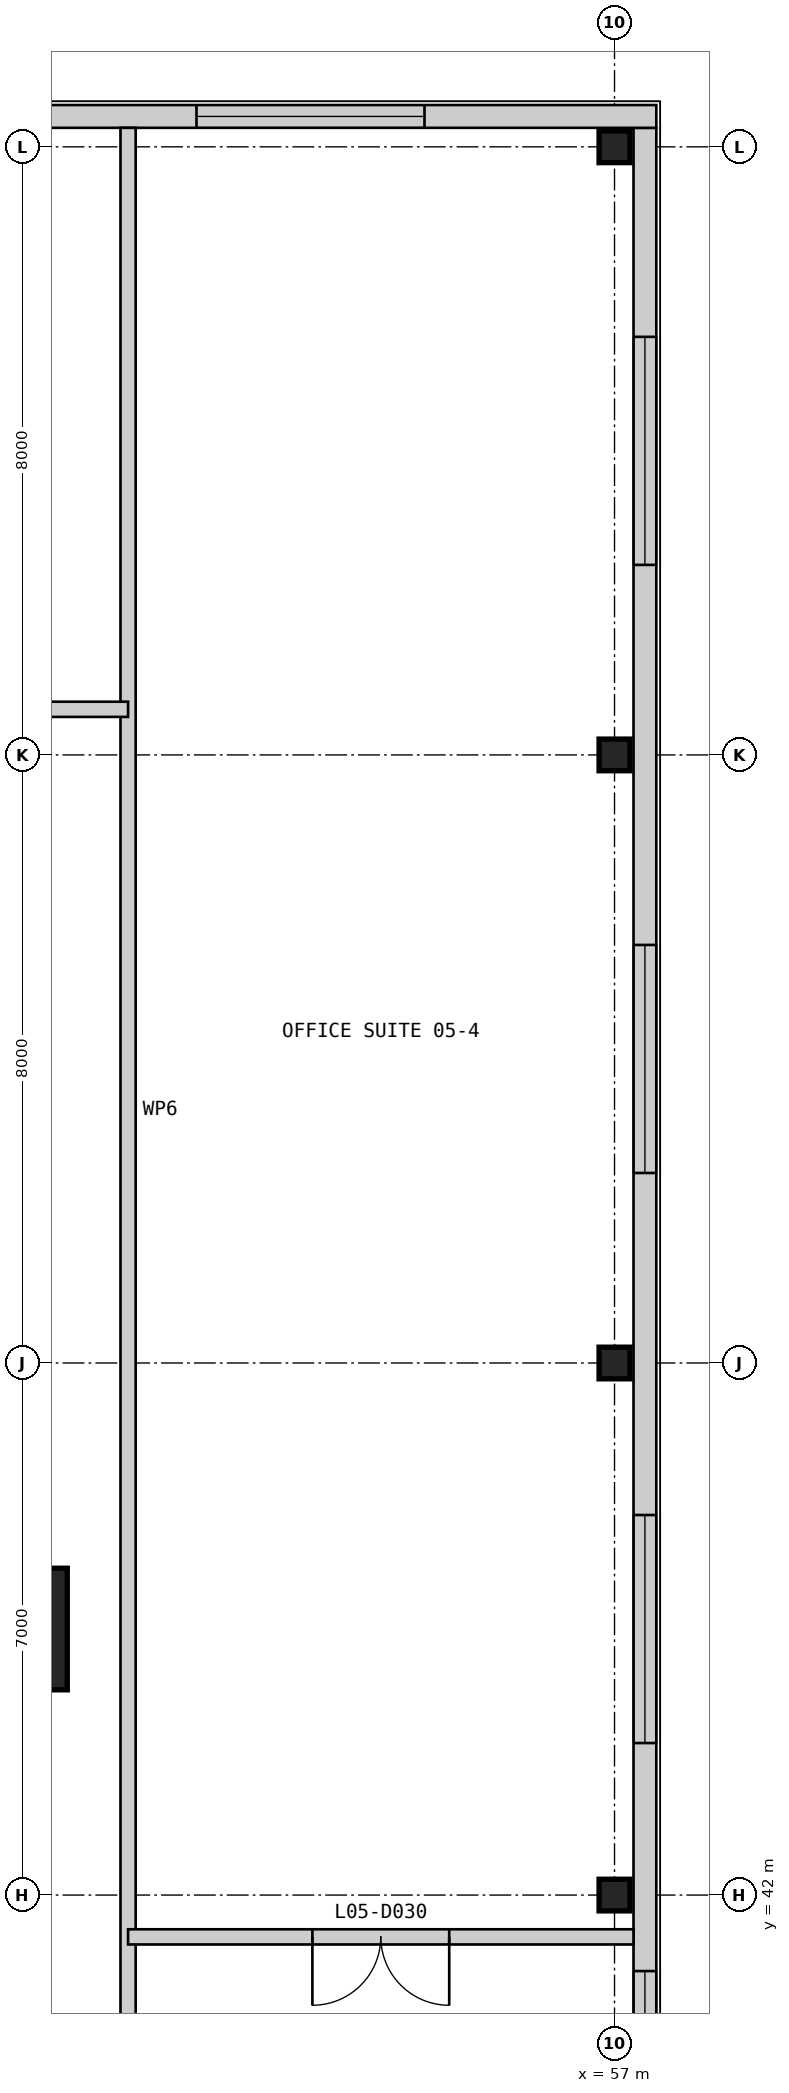
"""IFC4 building model, lengths in metres.
Left out: names, types, materials, properties, quantities, classifications, styles, units other than length and angle.
Written with IfcOpenShell. Run it as: python <this file> out.ifc"""

import sys

from ifc_helpers import new_model, si_unit, direction, frame, frame_2d, origin, origin_2d, place, context, subcontext, project, spatial, rectangle, i_section, extrude, element, fill, save


model = new_model("IFC4")
c1 = context("Model", 3, precision=1e-05, world=origin(), true_north=direction((0.0, 1.0)))
c2 = subcontext(c1, "Body", "Model", "MODEL_VIEW")
j1 = project(units=[si_unit("LENGTHUNIT", "METRE"), si_unit("PLANEANGLEUNIT", "RADIAN")], contexts=[c1])
p1 = place(None, origin())
s1 = spatial("IfcSite", under=j1, at=p1, CompositionType="ELEMENT")
p2 = place(p1, origin())
s2 = spatial("IfcBuilding", under=s1, at=p2, CompositionType="ELEMENT")
p3 = place(p2, frame((0.0, 0.0, 26.2)))
s3 = spatial("IfcBuildingStorey", under=s2, at=p3, CompositionType="ELEMENT", Elevation=26.2)
p4 = place(p3, frame((49.0, 45.5, 0.0), z_axis=(0.0, 0.0, 1.0), x_axis=(1.0, 0.0, 0.0)))
e1 = element("IfcColumn", 1, at=p4, inside=s3, PredefinedType="COLUMN", context=c2, shape_type="SweptSolid", body=[
    extrude(rectangle(XDim=1.6, YDim=1.6, at=origin_2d()), origin(), (0.0, 0.0, 1.0), 4.8),
])
for number, where, z_axis, x_axis in (
    (2, (57.0, 42.0, 0.0), (0.0, 0.0, 1.0), (1.0, 0.0, 0.0)),
    (3, (57.0, 49.0, 0.0), (0.0, 0.0, 1.0), (1.0, 0.0, 0.0)),
    (4, (57.0, 57.0, 0.0), (0.0, 0.0, 1.0), (1.0, 0.0, 0.0)),
    (5, (57.0, 65.0, 0.0), (0.0, 0.0, 1.0), (1.0, 0.0, 0.0)),
):
    element("IfcColumn", number, at=place(p3, frame(where, z_axis=z_axis, x_axis=x_axis)), inside=s3, PredefinedType="COLUMN", context=c2, shape_type="SweptSolid", body=[
        extrude(i_section(OverallWidth=0.406, OverallDepth=0.417, WebThickness=0.03, FlangeThickness=0.048, at=origin_2d()), origin(), (0.0, 0.0, 1.0), 4.8),
    ])
p5 = place(p3, frame((57.4, -7.25, 0.0), z_axis=(0.0, 0.0, 1.0), x_axis=(0.0, 1.0, 0.0)))
e6 = element("IfcWall", 6, at=p5, inside=s3, PredefinedType="SOLIDWALL", context=c2, shape_type="SweptSolid", body=[
    extrude(rectangle(XDim=72.5, YDim=0.3, at=frame_2d((36.25, 0.0))), origin(), (0.0, 0.0, 1.0), 4.5),
])
p6 = place(p5, frame((2.75, 0.0, 0.9)))
e7 = element("IfcOpeningElement", 7, at=p6, cuts=e6, PredefinedType="OPENING", context=c2, shape_type="SweptSolid", body=[
    extrude(rectangle(XDim=3.0, YDim=2.4, at=frame_2d((1.5, 1.2))), frame((0.0, 0.16, 0.0), z_axis=(0.0, -1.0, 0.0), x_axis=(1.0, 0.0, 0.0)), (0.0, 0.0, 1.0), 0.32),
])
p7 = place(p5, frame((10.75, 0.0, 0.9)))
e8 = element("IfcOpeningElement", 8, at=p7, cuts=e6, PredefinedType="OPENING", context=c2, shape_type="SweptSolid", body=[
    extrude(rectangle(XDim=3.0, YDim=2.4, at=frame_2d((1.5, 1.2))), frame((0.0, 0.16, 0.0), z_axis=(0.0, -1.0, 0.0), x_axis=(1.0, 0.0, 0.0)), (0.0, 0.0, 1.0), 0.32),
])
p8 = place(p5, frame((24.75, 0.0, 0.9)))
e9 = element("IfcOpeningElement", 9, at=p8, cuts=e6, PredefinedType="OPENING", context=c2, shape_type="SweptSolid", body=[
    extrude(rectangle(XDim=3.0, YDim=2.4, at=frame_2d((1.5, 1.2))), frame((0.0, 0.16, 0.0), z_axis=(0.0, -1.0, 0.0), x_axis=(1.0, 0.0, 0.0)), (0.0, 0.0, 1.0), 0.32),
])
p9 = place(p5, frame((36.75, 0.0, 0.9)))
e10 = element("IfcOpeningElement", 10, at=p9, cuts=e6, PredefinedType="OPENING", context=c2, shape_type="SweptSolid", body=[
    extrude(rectangle(XDim=3.0, YDim=2.4, at=frame_2d((1.5, 1.2))), frame((0.0, 0.16, 0.0), z_axis=(0.0, -1.0, 0.0), x_axis=(1.0, 0.0, 0.0)), (0.0, 0.0, 1.0), 0.32),
])
p10 = place(p5, frame((45.25, 0.0, 0.9)))
e11 = element("IfcOpeningElement", 11, at=p10, cuts=e6, PredefinedType="OPENING", context=c2, shape_type="SweptSolid", body=[
    extrude(rectangle(XDim=3.0, YDim=2.4, at=frame_2d((1.5, 1.2))), frame((0.0, 0.16, 0.0), z_axis=(0.0, -1.0, 0.0), x_axis=(1.0, 0.0, 0.0)), (0.0, 0.0, 1.0), 0.32),
])
p11 = place(p5, frame((51.25, 0.0, 0.9)))
e12 = element("IfcOpeningElement", 12, at=p11, cuts=e6, PredefinedType="OPENING", context=c2, shape_type="SweptSolid", body=[
    extrude(rectangle(XDim=3.0, YDim=2.4, at=frame_2d((1.5, 1.2))), frame((0.0, 0.16, 0.0), z_axis=(0.0, -1.0, 0.0), x_axis=(1.0, 0.0, 0.0)), (0.0, 0.0, 1.0), 0.32),
])
p12 = place(p5, frame((58.75, 0.0, 0.9)))
e13 = element("IfcOpeningElement", 13, at=p12, cuts=e6, PredefinedType="OPENING", context=c2, shape_type="SweptSolid", body=[
    extrude(rectangle(XDim=3.0, YDim=2.4, at=frame_2d((1.5, 1.2))), frame((0.0, 0.16, 0.0), z_axis=(0.0, -1.0, 0.0), x_axis=(1.0, 0.0, 0.0)), (0.0, 0.0, 1.0), 0.32),
])
p13 = place(p5, frame((66.75, 0.0, 0.9)))
e14 = element("IfcOpeningElement", 14, at=p13, cuts=e6, PredefinedType="OPENING", context=c2, shape_type="SweptSolid", body=[
    extrude(rectangle(XDim=3.0, YDim=2.4, at=frame_2d((1.5, 1.2))), frame((0.0, 0.16, 0.0), z_axis=(0.0, -1.0, 0.0), x_axis=(1.0, 0.0, 0.0)), (0.0, 0.0, 1.0), 0.32),
])
p14 = place(p3, frame((57.55, 65.4, 0.0), z_axis=(0.0, 0.0, 1.0), x_axis=(-1.0, 0.0, 0.0)))
e15 = element("IfcWall", 15, at=p14, inside=s3, PredefinedType="SOLIDWALL", context=c2, shape_type="SweptSolid", body=[
    extrude(rectangle(XDim=65.1, YDim=0.3, at=frame_2d((32.55, 0.0))), origin(), (0.0, 0.0, 1.0), 4.5),
])
p15 = place(p14, frame((59.05, 0.0, 0.9)))
e16 = element("IfcOpeningElement", 16, at=p15, cuts=e15, PredefinedType="OPENING", context=c2, shape_type="SweptSolid", body=[
    extrude(rectangle(XDim=3.0, YDim=2.4, at=frame_2d((1.5, 1.2))), frame((0.0, 0.16, 0.0), z_axis=(0.0, -1.0, 0.0), x_axis=(1.0, 0.0, 0.0)), (0.0, 0.0, 1.0), 0.32),
])
p16 = place(p14, frame((51.05, 0.0, 0.9)))
e17 = element("IfcOpeningElement", 17, at=p16, cuts=e15, PredefinedType="OPENING", context=c2, shape_type="SweptSolid", body=[
    extrude(rectangle(XDim=3.0, YDim=2.4, at=frame_2d((1.5, 1.2))), frame((0.0, 0.16, 0.0), z_axis=(0.0, -1.0, 0.0), x_axis=(1.0, 0.0, 0.0)), (0.0, 0.0, 1.0), 0.32),
])
p17 = place(p14, frame((37.05, 0.0, 0.9)))
e18 = element("IfcOpeningElement", 18, at=p17, cuts=e15, PredefinedType="OPENING", context=c2, shape_type="SweptSolid", body=[
    extrude(rectangle(XDim=3.0, YDim=2.4, at=frame_2d((1.5, 1.2))), frame((0.0, 0.16, 0.0), z_axis=(0.0, -1.0, 0.0), x_axis=(1.0, 0.0, 0.0)), (0.0, 0.0, 1.0), 0.32),
])
p18 = place(p14, frame((25.05, 0.0, 0.9)))
e19 = element("IfcOpeningElement", 19, at=p18, cuts=e15, PredefinedType="OPENING", context=c2, shape_type="SweptSolid", body=[
    extrude(rectangle(XDim=3.0, YDim=2.4, at=frame_2d((1.5, 1.2))), frame((0.0, 0.16, 0.0), z_axis=(0.0, -1.0, 0.0), x_axis=(1.0, 0.0, 0.0)), (0.0, 0.0, 1.0), 0.32),
])
p19 = place(p14, frame((16.55, 0.0, 0.9)))
e20 = element("IfcOpeningElement", 20, at=p19, cuts=e15, PredefinedType="OPENING", context=c2, shape_type="SweptSolid", body=[
    extrude(rectangle(XDim=3.0, YDim=2.4, at=frame_2d((1.5, 1.2))), frame((0.0, 0.16, 0.0), z_axis=(0.0, -1.0, 0.0), x_axis=(1.0, 0.0, 0.0)), (0.0, 0.0, 1.0), 0.32),
])
p20 = place(p14, frame((10.55, 0.0, 0.9)))
e21 = element("IfcOpeningElement", 21, at=p20, cuts=e15, PredefinedType="OPENING", context=c2, shape_type="SweptSolid", body=[
    extrude(rectangle(XDim=3.0, YDim=2.4, at=frame_2d((1.5, 1.2))), frame((0.0, 0.16, 0.0), z_axis=(0.0, -1.0, 0.0), x_axis=(1.0, 0.0, 0.0)), (0.0, 0.0, 1.0), 0.32),
])
p21 = place(p14, frame((3.05, 0.0, 0.9)))
e22 = element("IfcOpeningElement", 22, at=p21, cuts=e15, PredefinedType="OPENING", context=c2, shape_type="SweptSolid", body=[
    extrude(rectangle(XDim=3.0, YDim=2.4, at=frame_2d((1.5, 1.2))), frame((0.0, 0.16, 0.0), z_axis=(0.0, -1.0, 0.0), x_axis=(1.0, 0.0, 0.0)), (0.0, 0.0, 1.0), 0.32),
])
p22 = place(p3, frame((50.6, 39.4, 0.0), z_axis=(0.0, 0.0, 1.0), x_axis=(0.0, 1.0, 0.0)))
e23 = element("IfcWall", 23, at=p22, inside=s3, PredefinedType="PARTITIONING", context=c2, shape_type="SweptSolid", body=[
    extrude(rectangle(XDim=25.85, YDim=0.2, at=frame_2d((12.925, 0.0))), origin(), (0.0, 0.0, 1.0), 4.5),
])
p23 = place(p3, frame((50.6, 41.45, 0.0), z_axis=(0.0, 0.0, 1.0), x_axis=(1.0, 0.0, 0.0)))
e24 = element("IfcWall", 24, at=p23, inside=s3, PredefinedType="PARTITIONING", context=c2, shape_type="SweptSolid", body=[
    extrude(rectangle(XDim=6.65, YDim=0.2, at=frame_2d((3.325, 0.0))), origin(), (0.0, 0.0, 1.0), 4.5),
])
p24 = place(p23, frame((2.425, 0.0, 0.0)))
e25 = element("IfcOpeningElement", 25, at=p24, cuts=e24, PredefinedType="OPENING", context=c2, shape_type="SweptSolid", body=[
    extrude(rectangle(XDim=1.8, YDim=2.4, at=frame_2d((0.9, 1.2))), frame((0.0, 0.11, 0.0), z_axis=(0.0, -1.0, 0.0), x_axis=(1.0, 0.0, 0.0)), (0.0, 0.0, 1.0), 0.22),
])
p25 = place(p3, frame((34.4, 57.6, 0.0), z_axis=(0.0, 0.0, 1.0), x_axis=(1.0, 0.0, 0.0)))
e26 = element("IfcWall", 26, at=p25, inside=s3, PredefinedType="PARTITIONING", context=c2, shape_type="SweptSolid", body=[
    extrude(rectangle(XDim=16.2, YDim=0.2, at=frame_2d((8.1, 0.0))), origin(), (0.0, 0.0, 1.0), 4.5),
])
p26 = place(p10, origin())
e27 = element("IfcWindow", 27, at=p26, inside=s3, PartitioningType="SINGLE_PANEL", PredefinedType="WINDOW", context=c2, shape_type="SweptSolid", body=[
    extrude(rectangle(XDim=3.0, YDim=2.4, at=frame_2d((1.5, 1.2))), frame((0.0, 0.03, 0.0), z_axis=(0.0, -1.0, 0.0), x_axis=(1.0, 0.0, 0.0)), (0.0, 0.0, 1.0), 0.06),
])
fill(e11, e27)
p27 = place(p11, origin())
e28 = element("IfcWindow", 28, at=p27, inside=s3, PartitioningType="SINGLE_PANEL", PredefinedType="WINDOW", context=c2, shape_type="SweptSolid", body=[
    extrude(rectangle(XDim=3.0, YDim=2.4, at=frame_2d((1.5, 1.2))), frame((0.0, 0.03, 0.0), z_axis=(0.0, -1.0, 0.0), x_axis=(1.0, 0.0, 0.0)), (0.0, 0.0, 1.0), 0.06),
])
fill(e12, e28)
p28 = place(p12, origin())
e29 = element("IfcWindow", 29, at=p28, inside=s3, PartitioningType="SINGLE_PANEL", PredefinedType="WINDOW", context=c2, shape_type="SweptSolid", body=[
    extrude(rectangle(XDim=3.0, YDim=2.4, at=frame_2d((1.5, 1.2))), frame((0.0, 0.03, 0.0), z_axis=(0.0, -1.0, 0.0), x_axis=(1.0, 0.0, 0.0)), (0.0, 0.0, 1.0), 0.06),
])
fill(e13, e29)
p29 = place(p13, origin())
e30 = element("IfcWindow", 30, at=p29, inside=s3, PartitioningType="SINGLE_PANEL", PredefinedType="WINDOW", context=c2, shape_type="SweptSolid", body=[
    extrude(rectangle(XDim=3.0, YDim=2.4, at=frame_2d((1.5, 1.2))), frame((0.0, 0.03, 0.0), z_axis=(0.0, -1.0, 0.0), x_axis=(1.0, 0.0, 0.0)), (0.0, 0.0, 1.0), 0.06),
])
fill(e14, e30)
p30 = place(p21, origin())
e31 = element("IfcWindow", 31, at=p30, inside=s3, PartitioningType="SINGLE_PANEL", PredefinedType="WINDOW", context=c2, shape_type="SweptSolid", body=[
    extrude(rectangle(XDim=3.0, YDim=2.4, at=frame_2d((1.5, 1.2))), frame((0.0, 0.03, 0.0), z_axis=(0.0, -1.0, 0.0), x_axis=(1.0, 0.0, 0.0)), (0.0, 0.0, 1.0), 0.06),
])
fill(e22, e31)
p31 = place(p24, frame((1.8, 0.0, 0.0), z_axis=(0.0, 0.0, 1.0), x_axis=(-1.0, 0.0, 0.0)))
e32 = element("IfcDoor", 32, at=p31, inside=s3, OperationType="DOUBLE_DOOR_SINGLE_SWING", PredefinedType="DOOR", context=c2, shape_type="SweptSolid", body=[
    extrude(rectangle(XDim=1.8, YDim=2.4, at=frame_2d((0.9, 1.2))), frame((0.0, 0.025, 0.0), z_axis=(0.0, -1.0, 0.0), x_axis=(1.0, 0.0, 0.0)), (0.0, 0.0, 1.0), 0.05),
])
fill(e25, e32)
save(model, sys.argv[1])
